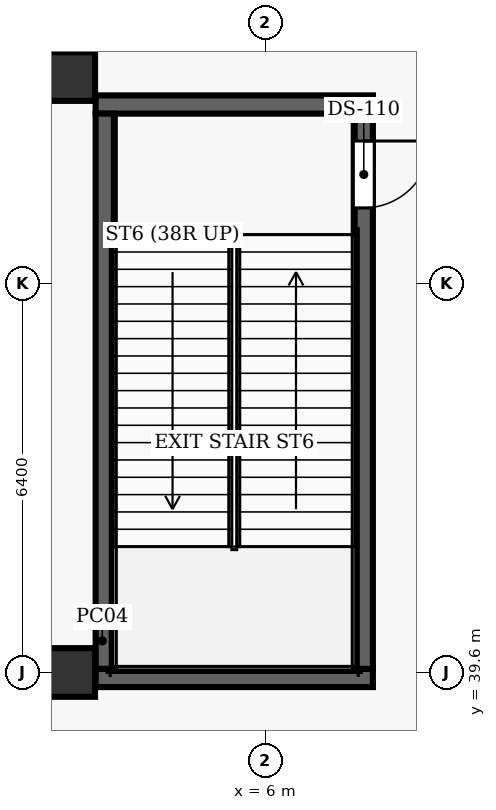
"""IFC4 building model, lengths in metres.
Left out: names, types, materials, properties, quantities, classifications, styles, units other than length and angle.
Written with IfcOpenShell. Run it as: python <this file> out.ifc"""

import sys

from ifc_helpers import new_model, si_unit, direction, frame, frame_2d, origin, origin_2d, place, context, subcontext, project, spatial, rectangle, extrude, element, fill, save


model = new_model("IFC4")
c1 = context("Model", 3, precision=1e-05, world=origin(), true_north=direction((0.0, 1.0)))
c2 = subcontext(c1, "Body", "Model", "MODEL_VIEW")
j1 = project(units=[si_unit("LENGTHUNIT", "METRE"), si_unit("PLANEANGLEUNIT", "RADIAN")], contexts=[c1])
p1 = place(None, origin())
s1 = spatial("IfcSite", under=j1, at=p1, CompositionType="ELEMENT")
p2 = place(p1, origin())
s2 = spatial("IfcBuilding", under=s1, at=p2, CompositionType="ELEMENT")
p3 = place(p2, frame((0.0, 0.0, 12.0)))
s3 = spatial("IfcBuildingStorey", under=s2, at=p3, CompositionType="ELEMENT", Elevation=12.0)
for number, where, z_axis, x_axis in (
    (1, (2.8, 39.6, 0.0), (0.0, 0.0, 1.0), (1.0, 0.0, 0.0)),
    (2, (2.8, 49.4, 0.0), (0.0, 0.0, 1.0), (1.0, 0.0, 0.0)),
):
    element("IfcColumn", number, at=place(p3, frame(where, z_axis=z_axis, x_axis=x_axis)), inside=s3, PredefinedType="COLUMN", context=c2, shape_type="SweptSolid", body=[
        extrude(rectangle(XDim=0.8, YDim=0.8, at=origin_2d()), origin(), (0.0, 0.0, 1.0), 6.6),
    ])
for number, where, z_axis, x_axis in (
    (3, (3.21, 39.51, 0.0), (0.0, 0.0, 1.0), (1.0, 0.0, 0.0)),
    (4, (3.21, 48.94, 0.0), (0.0, 0.0, 1.0), (1.0, 0.0, 0.0)),
):
    element("IfcWall", number, at=place(p3, frame(where, z_axis=z_axis, x_axis=x_axis)), inside=s3, PredefinedType="SHEAR", context=c2, shape_type="SweptSolid", body=[
        extrude(rectangle(XDim=4.56, YDim=0.3, at=frame_2d((2.28, 0.0))), origin(), (0.0, 0.0, 1.0), 6.6),
    ])
p4 = place(p3, frame((3.36, 39.66, 0.0), z_axis=(0.0, 0.0, 1.0), x_axis=(0.0, 1.0, 0.0)))
e5 = element("IfcWall", 5, at=p4, inside=s3, PredefinedType="SHEAR", context=c2, shape_type="SweptSolid", body=[
    extrude(rectangle(XDim=9.13, YDim=0.3, at=frame_2d((4.565, 0.0))), origin(), (0.0, 0.0, 1.0), 6.6),
])
p5 = place(p3, frame((7.62, 48.79, 0.0), z_axis=(0.0, 0.0, 1.0), x_axis=(0.0, -1.0, 0.0)))
e6 = element("IfcWall", 6, at=p5, inside=s3, PredefinedType="SHEAR", context=c2, shape_type="SweptSolid", body=[
    extrude(rectangle(XDim=9.13, YDim=0.3, at=frame_2d((4.565, 0.0))), origin(), (0.0, 0.0, 1.0), 6.6),
])
p6 = place(p5, frame((0.45, 0.0, 0.0)))
e7 = element("IfcOpeningElement", 7, at=p6, cuts=e6, PredefinedType="OPENING", context=c2, shape_type="SweptSolid", body=[
    extrude(rectangle(XDim=1.1, YDim=2.15, at=frame_2d((0.55, 1.075))), frame((0.0, 0.16, 0.0), z_axis=(0.0, -1.0, 0.0), x_axis=(1.0, 0.0, 0.0)), (0.0, 0.0, 1.0), 0.32),
])
p7 = place(p6, origin())
e8 = element("IfcDoor", 8, at=p7, inside=s3, OperationType="SINGLE_SWING_LEFT", PredefinedType="DOOR", context=c2, shape_type="SweptSolid", body=[
    extrude(rectangle(XDim=1.1, YDim=2.15, at=frame_2d((0.55, 1.075))), frame((0.0, 0.025, 0.0), z_axis=(0.0, -1.0, 0.0), x_axis=(1.0, 0.0, 0.0)), (0.0, 0.0, 1.0), 0.05),
])
fill(e7, e8)
save(model, sys.argv[1])
